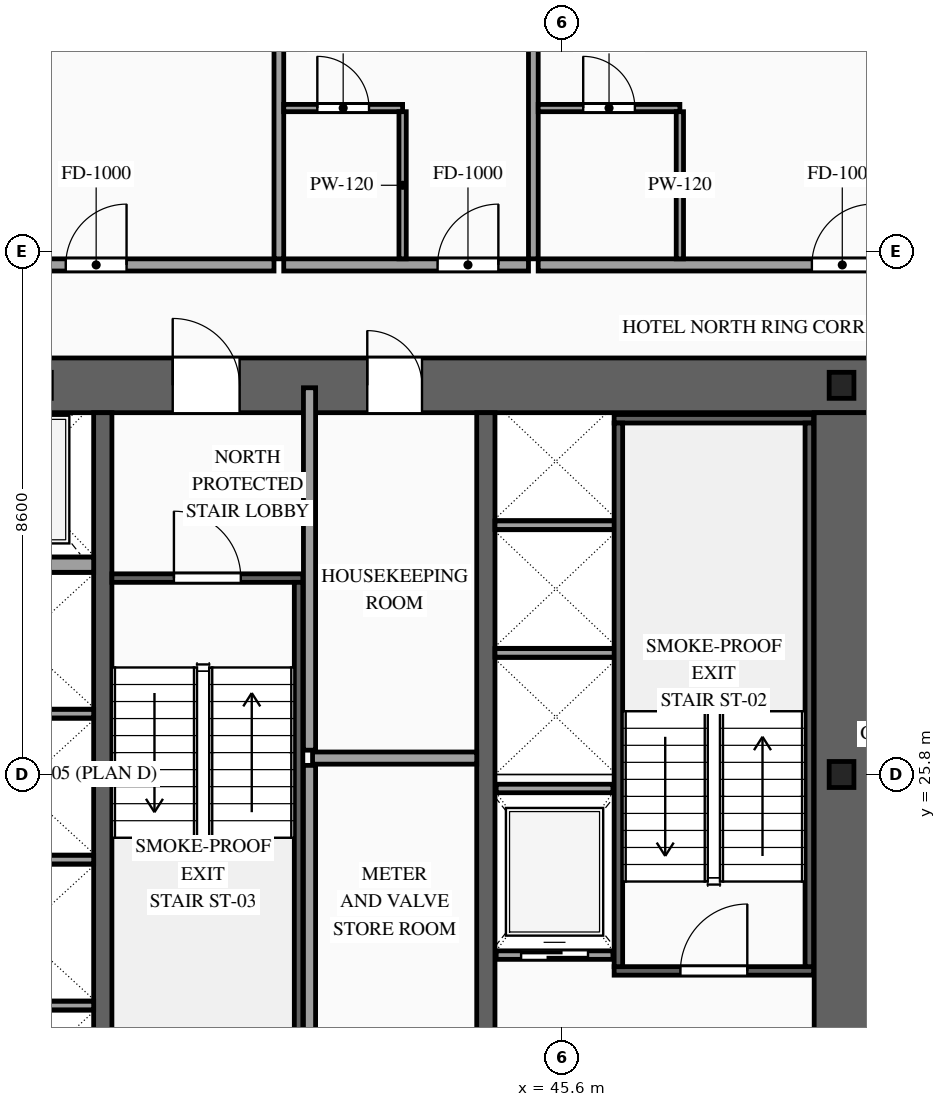
"""IFC4 building model, lengths in metres.
Left out: names, types, materials, properties, quantities, classifications, styles, units other than length and angle.
Written with IfcOpenShell. Run it as: python <this file> out.ifc"""

import sys

from ifc_helpers import new_model, si_unit, direction, frame, frame_2d, origin, origin_2d, place, context, subcontext, project, spatial, rectangle, i_section, extrude, source, transform, mapped, element, fill, save


model = new_model("IFC4")
c1 = context("Model", 3, precision=1e-05, world=origin(), true_north=direction((0.0, 1.0)))
c2 = subcontext(c1, "Body", "Model", "MODEL_VIEW")
j1 = project(units=[si_unit("LENGTHUNIT", "METRE"), si_unit("PLANEANGLEUNIT", "RADIAN")], contexts=[c1])
p1 = place(None, origin())
s1 = spatial("IfcSite", under=j1, at=p1, CompositionType="ELEMENT")
p2 = place(p1, origin())
s2 = spatial("IfcBuilding", under=s1, at=p2, CompositionType="ELEMENT")
p3 = place(p2, frame((0.0, 0.0, 46.0)))
s3 = spatial("IfcBuildingStorey", under=s2, at=p3, CompositionType="ELEMENT", Elevation=46.0)
p4 = place(p3, frame((23.35, 32.2, 0.0), z_axis=(0.0, 0.0, 1.0), x_axis=(1.0, 0.0, 0.0)))
e1 = element("IfcWall", 1, at=p4, inside=s3, PredefinedType="SHEAR", context=c2, shape_type="SweptSolid", body=[
    extrude(rectangle(XDim=27.3, YDim=0.9, at=frame_2d((13.65, 0.0))), origin(), (0.0, 0.0, 1.0), 3.6),
])
p5 = place(p4, frame((4.72, 0.0, 0.0)))
e2 = element("IfcOpeningElement", 2, at=p5, cuts=e1, PredefinedType="OPENING", context=c2, shape_type="SweptSolid", body=[
    extrude(rectangle(XDim=0.9, YDim=2.15, at=frame_2d((0.45, 1.075))), frame((0.0, 0.465, 0.0), z_axis=(0.0, -1.0, 0.0), x_axis=(1.0, 0.0, 0.0)), (0.0, 0.0, 1.0), 0.93),
])
p6 = place(p4, frame((10.0, 0.0, 0.0)))
e3 = element("IfcOpeningElement", 3, at=p6, cuts=e1, PredefinedType="OPENING", context=c2, shape_type="SweptSolid", body=[
    extrude(rectangle(XDim=1.1, YDim=2.2, at=frame_2d((0.55, 1.1))), frame((0.0, 0.465, 0.0), z_axis=(0.0, -1.0, 0.0), x_axis=(1.0, 0.0, 0.0)), (0.0, 0.0, 1.0), 0.93),
])
p7 = place(p4, frame((15.85, 0.0, 0.0)))
e4 = element("IfcOpeningElement", 4, at=p7, cuts=e1, PredefinedType="OPENING", context=c2, shape_type="SweptSolid", body=[
    extrude(rectangle(XDim=1.1, YDim=2.2, at=frame_2d((0.55, 1.1))), frame((0.0, 0.465, 0.0), z_axis=(0.0, -1.0, 0.0), x_axis=(1.0, 0.0, 0.0)), (0.0, 0.0, 1.0), 0.93),
])
p8 = place(p4, frame((19.05, 0.0, 0.0)))
e5 = element("IfcOpeningElement", 5, at=p8, cuts=e1, PredefinedType="OPENING", context=c2, shape_type="SweptSolid", body=[
    extrude(rectangle(XDim=0.9, YDim=2.15, at=frame_2d((0.45, 1.075))), frame((0.0, 0.465, 0.0), z_axis=(0.0, -1.0, 0.0), x_axis=(1.0, 0.0, 0.0)), (0.0, 0.0, 1.0), 0.93),
])
m1 = source(origin(), c2, "Body", "SweptSolid", [
    extrude(rectangle(XDim=11.9, YDim=0.9, at=frame_2d((5.95, 0.0))), origin(), (0.0, 0.0, 1.0), 3.6),
])
p9 = place(p3, frame((50.2, 19.85, 0.0), z_axis=(0.0, 0.0, 1.0), x_axis=(0.0, 1.0, 0.0)))
e6 = element("IfcWall", 6, at=p9, inside=s3, PredefinedType="SHEAR", context=c2, shape_type="MappedRepresentation", body=[
    mapped(m1, transform((0.0, 0.0, 0.0), scale=1.0)),
])
m2 = source(origin(), c2, "Body", "SweptSolid", [
    extrude(rectangle(XDim=11.9, YDim=0.3, at=frame_2d((5.95, 0.0))), origin(), (0.0, 0.0, 1.0), 3.6),
])
for number, where, z_axis, x_axis in (
    (7, (38.05, 19.85, 0.0), (0.0, 0.0, 1.0), (0.0, 1.0, 0.0)),
    (8, (44.35, 19.85, 0.0), (0.0, 0.0, 1.0), (0.0, 1.0, 0.0)),
):
    element("IfcWall", number, at=place(p3, frame(where, z_axis=z_axis, x_axis=x_axis)), inside=s3, PredefinedType="SOLIDWALL", context=c2, shape_type="MappedRepresentation", body=[
        mapped(m2, transform((0.0, 0.0, 0.0), scale=1.0)),
    ])
m3 = source(origin(), c2, "Body", "SweptSolid", [
    extrude(i_section(OverallWidth=0.407, OverallDepth=0.428, WebThickness=0.02, FlangeThickness=0.035, at=origin_2d()), origin(), (0.0, 0.0, 1.0), 3.6),
])
for number, where, z_axis, x_axis in (
    (9, (50.2, 25.8, 0.0), (0.0, 0.0, 1.0), (1.0, 0.0, 0.0)),
    (10, (50.2, 32.2, 0.0), (0.0, 0.0, 1.0), (1.0, 0.0, 0.0)),
):
    element("IfcColumn", number, at=place(p3, frame(where, z_axis=z_axis, x_axis=x_axis)), inside=s3, PredefinedType="COLUMN", context=c2, shape_type="MappedRepresentation", body=[
        mapped(m3, transform((0.0, 0.0, 0.0), scale=1.0)),
    ])
p10 = place(p3, frame((44.52, 22.83, 0.0), z_axis=(0.0, 0.0, 1.0), x_axis=(1.0, 0.0, 0.0)))
e11 = element("IfcWall", 11, at=p10, inside=s3, PredefinedType="SOLIDWALL", context=c2, shape_type="SweptSolid", body=[
    extrude(rectangle(XDim=1.92, YDim=0.14, at=frame_2d((0.96, 0.0))), origin(), (0.0, 0.0, 1.0), 3.38),
])
p11 = place(p10, frame((0.41, 0.0, 0.0)))
e12 = element("IfcOpeningElement", 12, at=p11, cuts=e11, PredefinedType="OPENING", context=c2, shape_type="SweptSolid", body=[
    extrude(rectangle(XDim=1.1, YDim=2.2, at=frame_2d((0.55, 1.1))), frame((0.0, 0.085, 0.0), z_axis=(0.0, -1.0, 0.0), x_axis=(1.0, 0.0, 0.0)), (0.0, 0.0, 1.0), 0.17),
])
m4 = source(origin(), c2, "Body", "SweptSolid", [
    extrude(rectangle(XDim=1.92, YDim=0.14, at=frame_2d((0.96, 0.0))), origin(), (0.0, 0.0, 1.0), 3.38),
])
p12 = place(p3, frame((44.52, 25.57, 0.0), z_axis=(0.0, 0.0, 1.0), x_axis=(1.0, 0.0, 0.0)))
e13 = element("IfcWall", 13, at=p12, inside=s3, PredefinedType="SOLIDWALL", context=c2, shape_type="MappedRepresentation", body=[
    mapped(m4, transform((0.0, 0.0, 0.0), scale=1.0)),
])
m5 = source(origin(), c2, "Body", "SweptSolid", [
    extrude(rectangle(XDim=2.4, YDim=0.14, at=frame_2d((1.2, 0.0))), origin(), (0.0, 0.0, 1.0), 3.38),
])
for number, where, z_axis, x_axis in (
    (14, (35.5, 22.0, 0.0), (0.0, 0.0, 1.0), (1.0, 0.0, 0.0)),
    (15, (35.5, 24.4, 0.0), (0.0, 0.0, 1.0), (1.0, 0.0, 0.0)),
    (16, (35.5, 26.8, 0.0), (0.0, 0.0, 1.0), (1.0, 0.0, 0.0)),
):
    element("IfcWall", number, at=place(p3, frame(where, z_axis=z_axis, x_axis=x_axis)), inside=s3, PredefinedType="SOLIDWALL", context=c2, shape_type="MappedRepresentation", body=[
        mapped(m5, transform((0.0, 0.0, 0.0), scale=1.0)),
    ])
m6 = source(origin(), c2, "Body", "SweptSolid", [
    extrude(rectangle(XDim=2.4, YDim=0.25, at=frame_2d((1.2, 0.0))), origin(), (0.0, 0.0, 1.0), 3.38),
])
p13 = place(p3, frame((35.5, 29.25, 0.0), z_axis=(0.0, 0.0, 1.0), x_axis=(1.0, 0.0, 0.0)))
e17 = element("IfcWall", 17, at=p13, inside=s3, PredefinedType="SOLIDWALL", context=c2, shape_type="MappedRepresentation", body=[
    mapped(m6, transform((0.0, 0.0, 0.0), scale=1.0)),
])
m7 = source(origin(), c2, "Body", "SweptSolid", [
    extrude(rectangle(XDim=2.0, YDim=0.14, at=frame_2d((1.0, 0.0))), origin(), (0.0, 0.0, 1.0), 3.38),
])
for number, where, z_axis, x_axis in (
    (18, (44.5, 27.8, 0.0), (0.0, 0.0, 1.0), (1.0, 0.0, 0.0)),
    (19, (44.5, 29.9, 0.0), (0.0, 0.0, 1.0), (1.0, 0.0, 0.0)),
):
    element("IfcWall", number, at=place(p3, frame(where, z_axis=z_axis, x_axis=x_axis)), inside=s3, PredefinedType="SOLIDWALL", context=c2, shape_type="MappedRepresentation", body=[
        mapped(m7, transform((0.0, 0.0, 0.0), scale=1.0)),
    ])
p14 = place(p3, frame((46.46, 22.57, 0.0), z_axis=(0.0, 0.0, 1.0), x_axis=(1.0, 0.0, 0.0)))
e20 = element("IfcWall", 20, at=p14, inside=s3, PredefinedType="SOLIDWALL", context=c2, shape_type="SweptSolid", body=[
    extrude(rectangle(XDim=3.28, YDim=0.14, at=frame_2d((1.64, 0.0))), origin(), (0.0, 0.0, 1.0), 3.38),
])
p15 = place(p14, frame((1.09, 0.0, 0.0)))
e21 = element("IfcOpeningElement", 21, at=p15, cuts=e20, PredefinedType="OPENING", context=c2, shape_type="SweptSolid", body=[
    extrude(rectangle(XDim=1.1, YDim=2.2, at=frame_2d((0.55, 1.1))), frame((0.0, 0.085, 0.0), z_axis=(0.0, -1.0, 0.0), x_axis=(1.0, 0.0, 0.0)), (0.0, 0.0, 1.0), 0.17),
])
m8 = source(origin(), c2, "Body", "SweptSolid", [
    extrude(rectangle(XDim=3.28, YDim=0.14, at=frame_2d((1.64, 0.0))), origin(), (0.0, 0.0, 1.0), 3.38),
])
p16 = place(p3, frame((46.46, 31.65, 0.0), z_axis=(0.0, 0.0, 1.0), x_axis=(1.0, 0.0, 0.0)))
e22 = element("IfcWall", 22, at=p16, inside=s3, PredefinedType="SOLIDWALL", context=c2, shape_type="MappedRepresentation", body=[
    mapped(m8, transform((0.0, 0.0, 0.0), scale=1.0)),
])
m9 = source(origin(), c2, "Body", "SweptSolid", [
    extrude(rectangle(XDim=8.94, YDim=0.14, at=frame_2d((4.47, 0.0))), origin(), (0.0, 0.0, 1.0), 3.38),
])
for number, where, z_axis, x_axis in (
    (23, (46.53, 22.64, 0.0), (0.0, 0.0, 1.0), (0.0, 1.0, 0.0)),
    (24, (49.67, 22.64, 0.0), (0.0, 0.0, 1.0), (0.0, 1.0, 0.0)),
):
    element("IfcWall", number, at=place(p3, frame(where, z_axis=z_axis, x_axis=x_axis)), inside=s3, PredefinedType="SOLIDWALL", context=c2, shape_type="MappedRepresentation", body=[
        mapped(m9, transform((0.0, 0.0, 0.0), scale=1.0)),
    ])
p17 = place(p3, frame((38.2, 29.03, 0.0), z_axis=(0.0, 0.0, 1.0), x_axis=(1.0, 0.0, 0.0)))
e25 = element("IfcWall", 25, at=p17, inside=s3, PredefinedType="SOLIDWALL", context=c2, shape_type="SweptSolid", body=[
    extrude(rectangle(XDim=3.14, YDim=0.14, at=frame_2d((1.57, 0.0))), origin(), (0.0, 0.0, 1.0), 3.38),
])
p18 = place(p17, frame((1.02, 0.0, 0.0)))
e26 = element("IfcOpeningElement", 26, at=p18, cuts=e25, PredefinedType="OPENING", context=c2, shape_type="SweptSolid", body=[
    extrude(rectangle(XDim=1.1, YDim=2.2, at=frame_2d((0.55, 1.1))), frame((0.0, 0.085, 0.0), z_axis=(0.0, -1.0, 0.0), x_axis=(1.0, 0.0, 0.0)), (0.0, 0.0, 1.0), 0.17),
])
m10 = source(origin(), c2, "Body", "SweptSolid", [
    extrude(rectangle(XDim=8.94, YDim=0.14, at=frame_2d((4.47, 0.0))), origin(), (0.0, 0.0, 1.0), 3.38),
])
p19 = place(p3, frame((41.27, 20.02, 0.0), z_axis=(0.0, 0.0, 1.0), x_axis=(0.0, 1.0, 0.0)))
e27 = element("IfcWall", 27, at=p19, inside=s3, PredefinedType="SOLIDWALL", context=c2, shape_type="MappedRepresentation", body=[
    mapped(m10, transform((0.0, 0.0, 0.0), scale=1.0)),
])
m11 = source(origin(), c2, "Body", "SweptSolid", [
    extrude(rectangle(XDim=6.51, YDim=0.2, at=frame_2d((3.255, 0.0))), origin(), (0.0, 0.0, 1.0), 3.38),
])
p20 = place(p3, frame((41.45, 19.44, 0.0), z_axis=(0.0, 0.0, 1.0), x_axis=(0.0, 1.0, 0.0)))
e28 = element("IfcWall", 28, at=p20, inside=s3, PredefinedType="PARTITIONING", context=c2, shape_type="MappedRepresentation", body=[
    mapped(m11, transform((0.0, 0.0, 0.0), scale=1.0)),
])
m12 = source(origin(), c2, "Body", "SweptSolid", [
    extrude(rectangle(XDim=2.7, YDim=0.2, at=frame_2d((1.35, 0.0))), origin(), (0.0, 0.0, 1.0), 3.38),
])
p21 = place(p3, frame((41.5, 26.07, 0.0), z_axis=(0.0, 0.0, 1.0), x_axis=(1.0, 0.0, 0.0)))
e29 = element("IfcWall", 29, at=p21, inside=s3, PredefinedType="PARTITIONING", context=c2, shape_type="MappedRepresentation", body=[
    mapped(m12, transform((0.0, 0.0, 0.0), scale=1.0)),
])
m13 = source(origin(), c2, "Body", "SweptSolid", [
    extrude(rectangle(XDim=5.96, YDim=0.2, at=frame_2d((2.98, 0.0))), origin(), (0.0, 0.0, 1.0), 3.38),
])
p22 = place(p3, frame((41.45, 26.2, 0.0), z_axis=(0.0, 0.0, 1.0), x_axis=(0.0, 1.0, 0.0)))
e30 = element("IfcWall", 30, at=p22, inside=s3, PredefinedType="PARTITIONING", context=c2, shape_type="MappedRepresentation", body=[
    mapped(m13, transform((0.0, 0.0, 0.0), scale=1.0)),
])
p23 = place(p3, frame((32.605, 34.18, 0.0), z_axis=(0.0, 0.0, 1.0), x_axis=(1.0, 0.0, 0.0)))
e31 = element("IfcWall", 31, at=p23, inside=s3, PredefinedType="PARTITIONING", context=c2, shape_type="SweptSolid", body=[
    extrude(rectangle(XDim=8.261, YDim=0.2, at=frame_2d((4.13, 0.0))), origin(), (0.0, 0.0, 1.0), 3.38),
])
p24 = place(p23, frame((4.836, 0.0, 0.0)))
e32 = element("IfcOpeningElement", 32, at=p24, cuts=e31, PredefinedType="OPENING", context=c2, shape_type="SweptSolid", body=[
    extrude(rectangle(XDim=1.0, YDim=2.2, at=frame_2d((0.5, 1.1))), frame((0.0, 0.115, 0.0), z_axis=(0.0, -1.0, 0.0), x_axis=(1.0, 0.0, 0.0)), (0.0, 0.0, 1.0), 0.23),
])
m14 = source(origin(), c2, "Body", "SweptSolid", [
    extrude(rectangle(XDim=16.47, YDim=0.16, at=frame_2d((8.235, 0.0))), origin(), (0.0, 0.0, 1.0), 3.38),
])
p25 = place(p3, frame((40.946, 34.28, 0.0), z_axis=(0.0, 0.0, 1.0), x_axis=(0.0, 1.0, 0.0)))
e33 = element("IfcWall", 33, at=p25, inside=s3, PredefinedType="PARTITIONING", context=c2, shape_type="MappedRepresentation", body=[
    mapped(m14, transform((0.0, 0.0, 0.0), scale=1.0)),
])
p26 = place(p3, frame((41.026, 34.18, 0.0), z_axis=(0.0, 0.0, 1.0), x_axis=(1.0, 0.0, 0.0)))
e34 = element("IfcWall", 34, at=p26, inside=s3, PredefinedType="PARTITIONING", context=c2, shape_type="SweptSolid", body=[
    extrude(rectangle(XDim=4.025, YDim=0.2, at=frame_2d((2.013, 0.0))), origin(), (0.0, 0.0, 1.0), 3.38),
])
p27 = place(p26, frame((2.53, 0.0, 0.0)))
e35 = element("IfcOpeningElement", 35, at=p27, cuts=e34, PredefinedType="OPENING", context=c2, shape_type="SweptSolid", body=[
    extrude(rectangle(XDim=1.0, YDim=2.2, at=frame_2d((0.5, 1.1))), frame((0.0, 0.115, 0.0), z_axis=(0.0, -1.0, 0.0), x_axis=(1.0, 0.0, 0.0)), (0.0, 0.0, 1.0), 0.23),
])
p28 = place(p3, frame((45.131, 34.28, 0.0), z_axis=(0.0, 0.0, 1.0), x_axis=(0.0, 1.0, 0.0)))
e36 = element("IfcWall", 36, at=p28, inside=s3, PredefinedType="PARTITIONING", context=c2, shape_type="MappedRepresentation", body=[
    mapped(m14, transform((0.0, 0.0, 0.0), scale=1.0)),
])
p29 = place(p3, frame((41.026, 36.76, 0.0), z_axis=(0.0, 0.0, 1.0), x_axis=(1.0, 0.0, 0.0)))
e37 = element("IfcWall", 37, at=p29, inside=s3, PredefinedType="PARTITIONING", context=c2, shape_type="SweptSolid", body=[
    extrude(rectangle(XDim=1.955, YDim=0.12, at=frame_2d((0.978, 0.0))), origin(), (0.0, 0.0, 1.0), 3.38),
])
p30 = place(p29, frame((0.552, 0.0, 0.0)))
e38 = element("IfcOpeningElement", 38, at=p30, cuts=e37, PredefinedType="OPENING", context=c2, shape_type="SweptSolid", body=[
    extrude(rectangle(XDim=0.85, YDim=2.1, at=frame_2d((0.425, 1.05))), frame((0.0, 0.075, 0.0), z_axis=(0.0, -1.0, 0.0), x_axis=(1.0, 0.0, 0.0)), (0.0, 0.0, 1.0), 0.15),
])
m15 = source(origin(), c2, "Body", "SweptSolid", [
    extrude(rectangle(XDim=2.42, YDim=0.12, at=frame_2d((1.21, 0.0))), origin(), (0.0, 0.0, 1.0), 3.38),
])
p31 = place(p3, frame((42.981, 34.28, 0.0), z_axis=(0.0, 0.0, 1.0), x_axis=(0.0, 1.0, 0.0)))
e39 = element("IfcWall", 39, at=p31, inside=s3, PredefinedType="PARTITIONING", context=c2, shape_type="MappedRepresentation", body=[
    mapped(m15, transform((0.0, 0.0, 0.0), scale=1.0)),
])
p32 = place(p3, frame((45.211, 34.18, 0.0), z_axis=(0.0, 0.0, 1.0), x_axis=(1.0, 0.0, 0.0)))
e40 = element("IfcWall", 40, at=p32, inside=s3, PredefinedType="PARTITIONING", context=c2, shape_type="SweptSolid", body=[
    extrude(rectangle(XDim=7.592, YDim=0.2, at=frame_2d((3.796, 0.0))), origin(), (0.0, 0.0, 1.0), 3.38),
])
p33 = place(p32, frame((4.501, 0.0, 0.0)))
e41 = element("IfcOpeningElement", 41, at=p33, cuts=e40, PredefinedType="OPENING", context=c2, shape_type="SweptSolid", body=[
    extrude(rectangle(XDim=1.0, YDim=2.2, at=frame_2d((0.5, 1.1))), frame((0.0, 0.115, 0.0), z_axis=(0.0, -1.0, 0.0), x_axis=(1.0, 0.0, 0.0)), (0.0, 0.0, 1.0), 0.23),
])
p34 = place(p3, frame((45.211, 36.76, 0.0), z_axis=(0.0, 0.0, 1.0), x_axis=(1.0, 0.0, 0.0)))
e42 = element("IfcWall", 42, at=p34, inside=s3, PredefinedType="PARTITIONING", context=c2, shape_type="SweptSolid", body=[
    extrude(rectangle(XDim=2.33, YDim=0.12, at=frame_2d((1.165, 0.0))), origin(), (0.0, 0.0, 1.0), 3.38),
])
p35 = place(p34, frame((0.74, 0.0, 0.0)))
e43 = element("IfcOpeningElement", 43, at=p35, cuts=e42, PredefinedType="OPENING", context=c2, shape_type="SweptSolid", body=[
    extrude(rectangle(XDim=0.85, YDim=2.1, at=frame_2d((0.425, 1.05))), frame((0.0, 0.075, 0.0), z_axis=(0.0, -1.0, 0.0), x_axis=(1.0, 0.0, 0.0)), (0.0, 0.0, 1.0), 0.15),
])
p36 = place(p3, frame((47.541, 34.28, 0.0), z_axis=(0.0, 0.0, 1.0), x_axis=(0.0, 1.0, 0.0)))
e44 = element("IfcWall", 44, at=p36, inside=s3, PredefinedType="PARTITIONING", context=c2, shape_type="MappedRepresentation", body=[
    mapped(m15, transform((0.0, 0.0, 0.0), scale=1.0)),
])
m16 = source(origin(), c2, "Body", "SweptSolid", [
    extrude(rectangle(XDim=1.1, YDim=2.2, at=frame_2d((0.55, 1.1))), frame((0.0, 0.025, 0.0), z_axis=(0.0, -1.0, 0.0), x_axis=(1.0, 0.0, 0.0)), (0.0, 0.0, 1.0), 0.05),
])
p37 = place(p11, origin())
e45 = element("IfcDoor", 45, at=p37, inside=s3, OperationType="SLIDING_TO_RIGHT", PredefinedType="DOOR", context=c2, shape_type="MappedRepresentation", body=[
    mapped(m16, transform((0.0, 0.0, 0.0), scale=1.0)),
])
fill(e12, e45)
m17 = source(origin(), c2, "Body", "SweptSolid", [
    extrude(rectangle(XDim=1.1, YDim=2.2, at=frame_2d((0.55, 1.1))), frame((0.0, 0.025, 0.0), z_axis=(0.0, -1.0, 0.0), x_axis=(1.0, 0.0, 0.0)), (0.0, 0.0, 1.0), 0.05),
])
p38 = place(p15, origin())
e46 = element("IfcDoor", 46, at=p38, inside=s3, OperationType="SINGLE_SWING_RIGHT", PredefinedType="DOOR", context=c2, shape_type="MappedRepresentation", body=[
    mapped(m17, transform((0.0, 0.0, 0.0), scale=1.0)),
])
fill(e21, e46)
p39 = place(p18, origin())
e47 = element("IfcDoor", 47, at=p39, inside=s3, OperationType="SINGLE_SWING_LEFT", PredefinedType="DOOR", context=c2, shape_type="MappedRepresentation", body=[
    mapped(m17, transform((0.0, 0.0, 0.0), scale=1.0)),
])
fill(e26, e47)
p40 = place(p7, origin())
e48 = element("IfcDoor", 48, at=p40, inside=s3, OperationType="SINGLE_SWING_LEFT", PredefinedType="DOOR", context=c2, shape_type="MappedRepresentation", body=[
    mapped(m17, transform((0.0, 0.0, 0.0), scale=1.0)),
])
fill(e4, e48)
m18 = source(origin(), c2, "Body", "SweptSolid", [
    extrude(rectangle(XDim=0.9, YDim=2.15, at=frame_2d((0.45, 1.075))), frame((0.0, 0.025, 0.0), z_axis=(0.0, -1.0, 0.0), x_axis=(1.0, 0.0, 0.0)), (0.0, 0.0, 1.0), 0.05),
])
p41 = place(p8, origin())
e49 = element("IfcDoor", 49, at=p41, inside=s3, OperationType="SINGLE_SWING_LEFT", PredefinedType="DOOR", context=c2, shape_type="MappedRepresentation", body=[
    mapped(m18, transform((0.0, 0.0, 0.0), scale=1.0)),
])
fill(e5, e49)
m19 = source(origin(), c2, "Body", "SweptSolid", [
    extrude(rectangle(XDim=1.0, YDim=2.2, at=frame_2d((0.5, 1.1))), frame((0.0, 0.025, 0.0), z_axis=(0.0, -1.0, 0.0), x_axis=(1.0, 0.0, 0.0)), (0.0, 0.0, 1.0), 0.05),
])
p42 = place(p24, origin())
e50 = element("IfcDoor", 50, at=p42, inside=s3, OperationType="SINGLE_SWING_RIGHT", PredefinedType="DOOR", context=c2, shape_type="MappedRepresentation", body=[
    mapped(m19, transform((0.0, 0.0, 0.0), scale=1.0)),
])
fill(e32, e50)
p43 = place(p27, origin())
e51 = element("IfcDoor", 51, at=p43, inside=s3, OperationType="SINGLE_SWING_RIGHT", PredefinedType="DOOR", context=c2, shape_type="MappedRepresentation", body=[
    mapped(m19, transform((0.0, 0.0, 0.0), scale=1.0)),
])
fill(e35, e51)
m20 = source(origin(), c2, "Body", "SweptSolid", [
    extrude(rectangle(XDim=0.85, YDim=2.1, at=frame_2d((0.425, 1.05))), frame((0.0, 0.025, 0.0), z_axis=(0.0, -1.0, 0.0), x_axis=(1.0, 0.0, 0.0)), (0.0, 0.0, 1.0), 0.05),
])
p44 = place(p30, origin())
e52 = element("IfcDoor", 52, at=p44, inside=s3, OperationType="SINGLE_SWING_LEFT", PredefinedType="DOOR", context=c2, shape_type="MappedRepresentation", body=[
    mapped(m20, transform((0.0, 0.0, 0.0), scale=1.0)),
])
fill(e38, e52)
p45 = place(p33, origin())
e53 = element("IfcDoor", 53, at=p45, inside=s3, OperationType="SINGLE_SWING_RIGHT", PredefinedType="DOOR", context=c2, shape_type="MappedRepresentation", body=[
    mapped(m19, transform((0.0, 0.0, 0.0), scale=1.0)),
])
fill(e41, e53)
p46 = place(p35, origin())
e54 = element("IfcDoor", 54, at=p46, inside=s3, OperationType="SINGLE_SWING_LEFT", PredefinedType="DOOR", context=c2, shape_type="MappedRepresentation", body=[
    mapped(m20, transform((0.0, 0.0, 0.0), scale=1.0)),
])
fill(e43, e54)
save(model, sys.argv[1])
